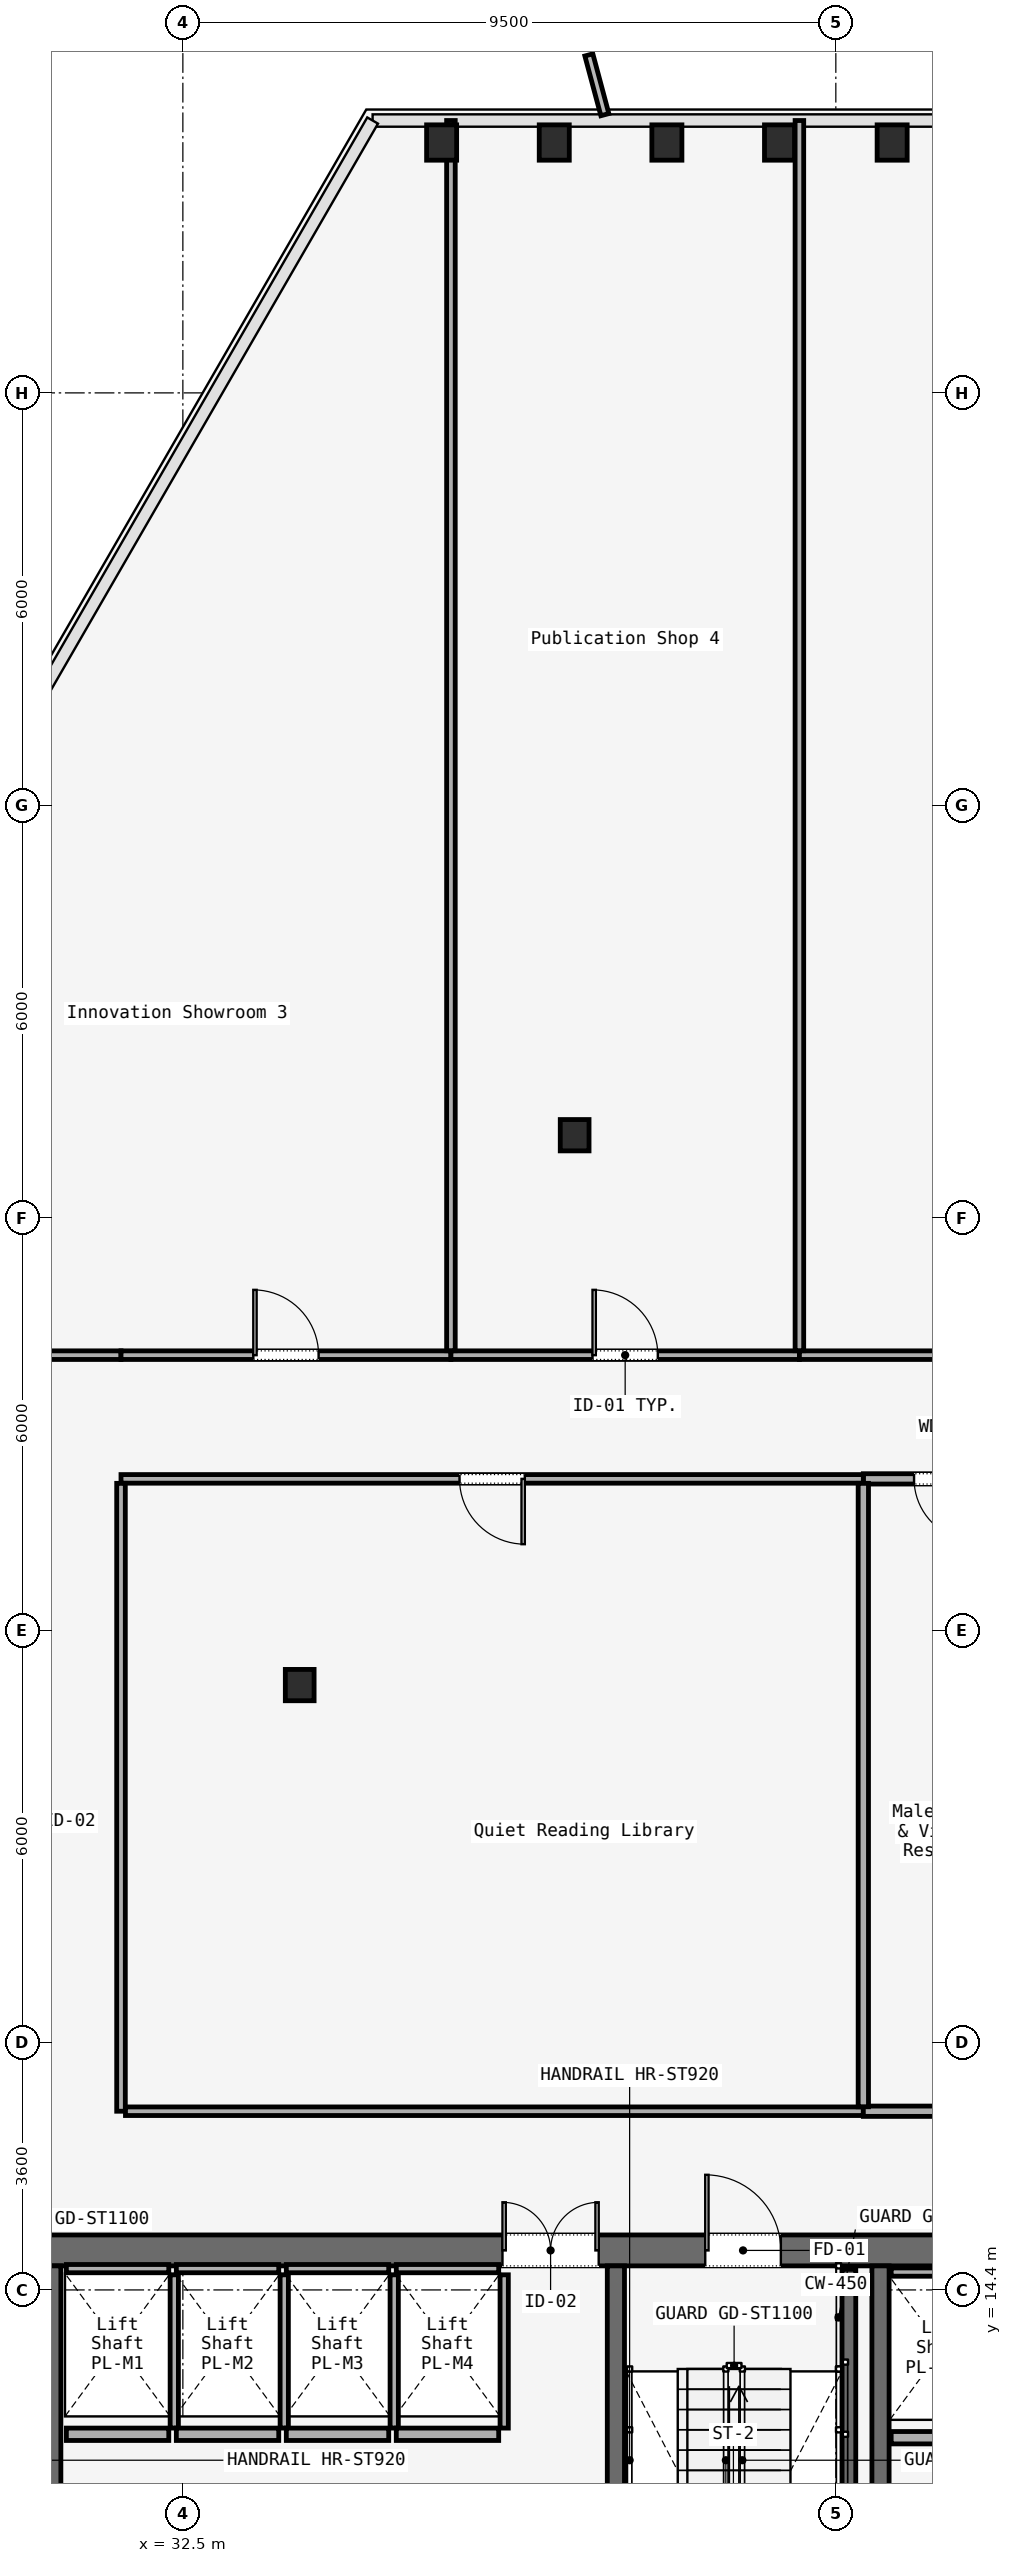
"""IFC4 building model, lengths in metres.
Left out: names, types, materials, properties, quantities, classifications, styles, units other than length and angle.
Written with IfcOpenShell. Run it as: python <this file> out.ifc"""

import sys

from ifc_helpers import new_model, si_unit, direction, frame, frame_2d, origin, origin_2d, place, context, subcontext, project, spatial, rectangle, i_section, extrude, element, fill, save


model = new_model("IFC4")
c1 = context("Model", 3, precision=1e-05, world=origin(), true_north=direction((0.0, 1.0)))
c2 = subcontext(c1, "Body", "Model", "MODEL_VIEW")
j1 = project(units=[si_unit("LENGTHUNIT", "METRE"), si_unit("PLANEANGLEUNIT", "RADIAN")], contexts=[c1])
p1 = place(None, origin())
s1 = spatial("IfcSite", under=j1, at=p1, CompositionType="ELEMENT")
p2 = place(p1, origin())
s2 = spatial("IfcBuilding", under=s1, at=p2, CompositionType="ELEMENT")
p3 = place(p2, frame((0.0, 0.0, 104.4)))
s3 = spatial("IfcBuildingStorey", under=s2, at=p3, CompositionType="ELEMENT", Elevation=104.4)
p4 = place(p3, frame((26.45, 14.975, 0.0), z_axis=(0.0, 0.0, 1.0), x_axis=(1.0, 0.0, 0.0)))
e1 = element("IfcWall", 1, at=p4, inside=s3, PredefinedType="SOLIDWALL", context=c2, shape_type="SweptSolid", body=[
    extrude(rectangle(XDim=31.1, YDim=0.45, at=frame_2d((15.55, 0.0))), origin(), (0.0, 0.0, 1.0), 3.58),
])
p5 = place(p4, frame((1.65, 0.0, 0.0)))
e2 = element("IfcOpeningElement", 2, at=p5, cuts=e1, PredefinedType="OPENING", context=c2, shape_type="SweptSolid", body=[
    extrude(rectangle(XDim=1.1, YDim=2.2, at=frame_2d((0.55, 1.1))), frame((0.0, 0.225, 0.0), z_axis=(0.0, -1.0, 0.0), x_axis=(1.0, 0.0, 0.0)), (0.0, 0.0, 1.0), 0.45),
])
p6 = place(p4, frame((13.65, 0.0, 0.0)))
e3 = element("IfcOpeningElement", 3, at=p6, cuts=e1, PredefinedType="OPENING", context=c2, shape_type="SweptSolid", body=[
    extrude(rectangle(XDim=1.1, YDim=2.2, at=frame_2d((0.55, 1.1))), frame((0.0, 0.225, 0.0), z_axis=(0.0, -1.0, 0.0), x_axis=(1.0, 0.0, 0.0)), (0.0, 0.0, 1.0), 0.45),
])
p7 = place(p4, frame((25.55, 0.0, 0.0)))
e4 = element("IfcOpeningElement", 4, at=p7, cuts=e1, PredefinedType="OPENING", context=c2, shape_type="SweptSolid", body=[
    extrude(rectangle(XDim=1.1, YDim=2.2, at=frame_2d((0.55, 1.1))), frame((0.0, 0.225, 0.0), z_axis=(0.0, -1.0, 0.0), x_axis=(1.0, 0.0, 0.0)), (0.0, 0.0, 1.0), 0.45),
])
p8 = place(p4, frame((10.7, 0.0, 0.0)))
e5 = element("IfcOpeningElement", 5, at=p8, cuts=e1, PredefinedType="OPENING", context=c2, shape_type="SweptSolid", body=[
    extrude(rectangle(XDim=1.4, YDim=2.2, at=frame_2d((0.7, 1.1))), frame((0.0, 0.225, 0.0), z_axis=(0.0, -1.0, 0.0), x_axis=(1.0, 0.0, 0.0)), (0.0, 0.0, 1.0), 0.45),
])
p9 = place(p4, frame((19.35, 0.0, 0.0)))
e6 = element("IfcOpeningElement", 6, at=p9, cuts=e1, PredefinedType="OPENING", context=c2, shape_type="SweptSolid", body=[
    extrude(rectangle(XDim=1.1, YDim=2.2, at=frame_2d((0.55, 1.1))), frame((0.0, 0.225, 0.0), z_axis=(0.0, -1.0, 0.0), x_axis=(1.0, 0.0, 0.0)), (0.0, 0.0, 1.0), 0.45),
])
p10 = place(p4, frame((21.4, 0.0, 0.0)))
e7 = element("IfcOpeningElement", 7, at=p10, cuts=e1, PredefinedType="OPENING", context=c2, shape_type="SweptSolid", body=[
    extrude(rectangle(XDim=0.9, YDim=2.1, at=frame_2d((0.45, 1.05))), frame((0.0, 0.225, 0.0), z_axis=(0.0, -1.0, 0.0), x_axis=(1.0, 0.0, 0.0)), (0.0, 0.0, 1.0), 0.45),
])
p11 = place(p4, frame((23.35, 0.0, 0.0)))
e8 = element("IfcOpeningElement", 8, at=p11, cuts=e1, PredefinedType="OPENING", context=c2, shape_type="SweptSolid", body=[
    extrude(rectangle(XDim=1.3, YDim=2.3, at=frame_2d((0.65, 1.15))), frame((0.0, 0.225, 0.0), z_axis=(0.0, -1.0, 0.0), x_axis=(1.0, 0.0, 0.0)), (0.0, 0.0, 1.0), 0.45),
])
for number, where, z_axis, x_axis in (
    (9, (30.6, 5.85, 0.0), (0.0, 0.0, 1.0), (0.0, 1.0, 0.0)),
    (10, (38.8, 5.85, 0.0), (0.0, 0.0, 1.0), (0.0, 1.0, 0.0)),
    (11, (42.65, 5.85, 0.0), (0.0, 0.0, 1.0), (0.0, 1.0, 0.0)),
):
    element("IfcWall", number, at=place(p3, frame(where, z_axis=z_axis, x_axis=x_axis)), inside=s3, PredefinedType="SOLIDWALL", context=c2, shape_type="SweptSolid", body=[
        extrude(rectangle(XDim=8.9, YDim=0.25, at=frame_2d((4.45, 0.0))), origin(), (0.0, 0.0, 1.0), 3.58),
    ])
for number, where, z_axis, x_axis in (
    (12, (34.2, 23.2, 0.0), (0.0, 0.0, 1.0), (1.0, 0.0, 0.0)),
    (13, (38.2, 31.2, 0.0), (0.0, 0.0, 1.0), (1.0, 0.0, 0.0)),
):
    element("IfcColumn", number, at=place(p3, frame(where, z_axis=z_axis, x_axis=x_axis)), inside=s3, PredefinedType="COLUMN", context=c2, shape_type="SweptSolid", body=[
        extrude(i_section(OverallWidth=0.418, OverallDepth=0.456, WebThickness=0.042, FlangeThickness=0.067, FilletRadius=0.015, at=origin_2d()), origin(), (0.0, 0.0, 1.0), 3.58),
    ])
for number, where, z_axis, x_axis in (
    (14, (42.819, 45.643, 0.0), (0.0, 0.0, 1.0), (1.0, 0.0, 0.0)),
    (15, (41.181, 45.643, 0.0), (0.0, 0.0, 1.0), (1.0, 0.0, 0.0)),
    (16, (39.542, 45.643, 0.0), (0.0, 0.0, 1.0), (1.0, 0.0, 0.0)),
    (17, (37.903, 45.643, 0.0), (0.0, 0.0, 1.0), (1.0, 0.0, 0.0)),
    (18, (36.265, 45.643, 0.0), (0.0, 0.0, 1.0), (1.0, 0.0, 0.0)),
):
    element("IfcColumn", number, at=place(p3, frame(where, z_axis=z_axis, x_axis=x_axis)), inside=s3, PredefinedType="COLUMN", context=c2, shape_type="SweptSolid", body=[
        extrude(i_section(OverallWidth=0.437, OverallDepth=0.514, WebThickness=0.061, FlangeThickness=0.077, FilletRadius=0.015, at=origin_2d()), origin(), (0.0, 0.0, 1.0), 3.58),
    ])
p12 = place(p3, frame((42.19, 14.7, 0.0), z_axis=(0.0, 0.0, 1.0), x_axis=(0.0, -1.0, 0.0)))
e19 = element("IfcWall", 19, at=p12, inside=s3, PredefinedType="SOLIDWALL", context=c2, shape_type="SweptSolid", body=[
    extrude(rectangle(XDim=7.65, YDim=0.2, at=frame_2d((3.825, 0.0))), origin(), (0.0, 0.0, 1.0), 3.8),
])
p13 = place(p3, frame((30.805, 12.3, 0.0), z_axis=(0.0, 0.0, 1.0), x_axis=(1.0, 0.0, 0.0)))
e20 = element("IfcWall", 20, at=p13, inside=s3, PredefinedType="SOLIDWALL", context=c2, shape_type="SweptSolid", body=[
    extrude(rectangle(XDim=1.49, YDim=0.18, at=frame_2d((0.745, 0.0))), origin(), (0.0, 0.0, 1.0), 2.95),
])
p14 = place(p3, frame((30.805, 14.71, 0.0), z_axis=(0.0, 0.0, 1.0), x_axis=(1.0, 0.0, 0.0)))
e21 = element("IfcWall", 21, at=p14, inside=s3, PredefinedType="SOLIDWALL", context=c2, shape_type="SweptSolid", body=[
    extrude(rectangle(XDim=1.49, YDim=0.12, at=frame_2d((0.745, 0.0))), origin(), (0.0, 0.0, 1.0), 2.95),
])
p15 = place(p3, frame((32.375, 12.39, 0.0), z_axis=(0.0, 0.0, 1.0), x_axis=(0.0, 1.0, 0.0)))
e22 = element("IfcWall", 22, at=p15, inside=s3, PredefinedType="SOLIDWALL", context=c2, shape_type="SweptSolid", body=[
    extrude(rectangle(XDim=2.23, YDim=0.12, at=frame_2d((1.115, 0.0))), origin(), (0.0, 0.0, 1.0), 2.95),
])
p16 = place(p3, frame((32.405, 12.3, 0.0), z_axis=(0.0, 0.0, 1.0), x_axis=(1.0, 0.0, 0.0)))
e23 = element("IfcWall", 23, at=p16, inside=s3, PredefinedType="SOLIDWALL", context=c2, shape_type="SweptSolid", body=[
    extrude(rectangle(XDim=1.49, YDim=0.18, at=frame_2d((0.745, 0.0))), origin(), (0.0, 0.0, 1.0), 2.95),
])
p17 = place(p3, frame((32.405, 14.71, 0.0), z_axis=(0.0, 0.0, 1.0), x_axis=(1.0, 0.0, 0.0)))
e24 = element("IfcWall", 24, at=p17, inside=s3, PredefinedType="SOLIDWALL", context=c2, shape_type="SweptSolid", body=[
    extrude(rectangle(XDim=1.49, YDim=0.12, at=frame_2d((0.745, 0.0))), origin(), (0.0, 0.0, 1.0), 2.95),
])
p18 = place(p3, frame((33.975, 12.39, 0.0), z_axis=(0.0, 0.0, 1.0), x_axis=(0.0, 1.0, 0.0)))
e25 = element("IfcWall", 25, at=p18, inside=s3, PredefinedType="SOLIDWALL", context=c2, shape_type="SweptSolid", body=[
    extrude(rectangle(XDim=2.23, YDim=0.12, at=frame_2d((1.115, 0.0))), origin(), (0.0, 0.0, 1.0), 2.95),
])
p19 = place(p3, frame((34.005, 12.3, 0.0), z_axis=(0.0, 0.0, 1.0), x_axis=(1.0, 0.0, 0.0)))
e26 = element("IfcWall", 26, at=p19, inside=s3, PredefinedType="SOLIDWALL", context=c2, shape_type="SweptSolid", body=[
    extrude(rectangle(XDim=1.49, YDim=0.18, at=frame_2d((0.745, 0.0))), origin(), (0.0, 0.0, 1.0), 2.95),
])
p20 = place(p3, frame((34.005, 14.71, 0.0), z_axis=(0.0, 0.0, 1.0), x_axis=(1.0, 0.0, 0.0)))
e27 = element("IfcWall", 27, at=p20, inside=s3, PredefinedType="SOLIDWALL", context=c2, shape_type="SweptSolid", body=[
    extrude(rectangle(XDim=1.49, YDim=0.12, at=frame_2d((0.745, 0.0))), origin(), (0.0, 0.0, 1.0), 2.95),
])
p21 = place(p3, frame((35.575, 12.39, 0.0), z_axis=(0.0, 0.0, 1.0), x_axis=(0.0, 1.0, 0.0)))
e28 = element("IfcWall", 28, at=p21, inside=s3, PredefinedType="SOLIDWALL", context=c2, shape_type="SweptSolid", body=[
    extrude(rectangle(XDim=2.23, YDim=0.12, at=frame_2d((1.115, 0.0))), origin(), (0.0, 0.0, 1.0), 2.95),
])
p22 = place(p3, frame((35.605, 12.3, 0.0), z_axis=(0.0, 0.0, 1.0), x_axis=(1.0, 0.0, 0.0)))
e29 = element("IfcWall", 29, at=p22, inside=s3, PredefinedType="SOLIDWALL", context=c2, shape_type="SweptSolid", body=[
    extrude(rectangle(XDim=1.49, YDim=0.18, at=frame_2d((0.745, 0.0))), origin(), (0.0, 0.0, 1.0), 2.95),
])
p23 = place(p3, frame((35.605, 14.71, 0.0), z_axis=(0.0, 0.0, 1.0), x_axis=(1.0, 0.0, 0.0)))
e30 = element("IfcWall", 30, at=p23, inside=s3, PredefinedType="SOLIDWALL", context=c2, shape_type="SweptSolid", body=[
    extrude(rectangle(XDim=1.49, YDim=0.12, at=frame_2d((0.745, 0.0))), origin(), (0.0, 0.0, 1.0), 2.95),
])
p24 = place(p3, frame((37.175, 12.39, 0.0), z_axis=(0.0, 0.0, 1.0), x_axis=(0.0, 1.0, 0.0)))
e31 = element("IfcWall", 31, at=p24, inside=s3, PredefinedType="SOLIDWALL", context=c2, shape_type="SweptSolid", body=[
    extrude(rectangle(XDim=2.23, YDim=0.12, at=frame_2d((1.115, 0.0))), origin(), (0.0, 0.0, 1.0), 2.95),
])
p25 = place(p3, frame((42.805, 12.25, 0.0), z_axis=(0.0, 0.0, 1.0), x_axis=(1.0, 0.0, 0.0)))
e32 = element("IfcWall", 32, at=p25, inside=s3, PredefinedType="SOLIDWALL", context=c2, shape_type="SweptSolid", body=[
    extrude(rectangle(XDim=1.49, YDim=0.18, at=frame_2d((0.745, 0.0))), origin(), (0.0, 0.0, 1.0), 2.95),
])
p26 = place(p3, frame((42.805, 14.66, 0.0), z_axis=(0.0, 0.0, 1.0), x_axis=(1.0, 0.0, 0.0)))
e33 = element("IfcWall", 33, at=p26, inside=s3, PredefinedType="SOLIDWALL", context=c2, shape_type="SweptSolid", body=[
    extrude(rectangle(XDim=1.49, YDim=0.12, at=frame_2d((0.745, 0.0))), origin(), (0.0, 0.0, 1.0), 2.95),
])
p27 = place(p3, frame((29.865, 28.0, 0.0), z_axis=(0.0, 0.0, 1.0), x_axis=(1.0, 0.0, 0.0)))
e34 = element("IfcWall", 34, at=p27, inside=s3, PredefinedType="PARTITIONING", context=c2, shape_type="SweptSolid", body=[
    extrude(rectangle(XDim=1.735, YDim=0.125, at=frame_2d((0.868, 0.0))), origin(), (0.0, 0.0, 1.0), 2.95),
])
p28 = place(p3, frame((31.6, 28.0, 0.0), z_axis=(0.0, 0.0, 1.0), x_axis=(1.0, 0.0, 0.0)))
e35 = element("IfcWall", 35, at=p28, inside=s3, PredefinedType="PARTITIONING", context=c2, shape_type="SweptSolid", body=[
    extrude(rectangle(XDim=4.8, YDim=0.125, at=frame_2d((2.4, 0.0))), origin(), (0.0, 0.0, 1.0), 2.95),
])
p29 = place(p28, frame((1.925, 0.0, 0.0)))
e36 = element("IfcOpeningElement", 36, at=p29, cuts=e35, PredefinedType="OPENING", context=c2, shape_type="SweptSolid", body=[
    extrude(rectangle(XDim=0.95, YDim=2.2, at=frame_2d((0.475, 1.1))), frame((0.0, 0.062, 0.0), z_axis=(0.0, -1.0, 0.0), x_axis=(1.0, 0.0, 0.0)), (0.0, 0.0, 1.0), 0.125),
])
p30 = place(p3, frame((36.4, 28.0, 0.0), z_axis=(0.0, 0.0, 1.0), x_axis=(1.0, 0.0, 0.0)))
e37 = element("IfcWall", 37, at=p30, inside=s3, PredefinedType="PARTITIONING", context=c2, shape_type="SweptSolid", body=[
    extrude(rectangle(XDim=5.07, YDim=0.125, at=frame_2d((2.535, 0.0))), origin(), (0.0, 0.0, 1.0), 2.95),
])
p31 = place(p30, frame((2.06, 0.0, 0.0)))
e38 = element("IfcOpeningElement", 38, at=p31, cuts=e37, PredefinedType="OPENING", context=c2, shape_type="SweptSolid", body=[
    extrude(rectangle(XDim=0.95, YDim=2.2, at=frame_2d((0.475, 1.1))), frame((0.0, 0.062, 0.0), z_axis=(0.0, -1.0, 0.0), x_axis=(1.0, 0.0, 0.0)), (0.0, 0.0, 1.0), 0.125),
])
p32 = place(p3, frame((41.47, 28.0, 0.0), z_axis=(0.0, 0.0, 1.0), x_axis=(1.0, 0.0, 0.0)))
e39 = element("IfcWall", 39, at=p32, inside=s3, PredefinedType="PARTITIONING", context=c2, shape_type="SweptSolid", body=[
    extrude(rectangle(XDim=7.93, YDim=0.125, at=frame_2d((3.965, 0.0))), origin(), (0.0, 0.0, 1.0), 2.95),
])
p33 = place(p32, frame((3.49, 0.0, 0.0)))
e40 = element("IfcOpeningElement", 40, at=p33, cuts=e39, PredefinedType="OPENING", context=c2, shape_type="SweptSolid", body=[
    extrude(rectangle(XDim=0.95, YDim=2.2, at=frame_2d((0.475, 1.1))), frame((0.0, 0.062, 0.0), z_axis=(0.0, -1.0, 0.0), x_axis=(1.0, 0.0, 0.0)), (0.0, 0.0, 1.0), 0.125),
])
p34 = place(p3, frame((44.776, 26.2, 0.0), z_axis=(0.0, 0.0, 1.0), x_axis=(-1.0, 0.0, 0.0)))
e41 = element("IfcWall", 41, at=p34, inside=s3, PredefinedType="PARTITIONING", context=c2, shape_type="SweptSolid", body=[
    extrude(rectangle(XDim=2.376, YDim=0.15, at=frame_2d((1.188, 0.0))), origin(), (0.0, 0.0, 1.0), 2.95),
])
p35 = place(p34, frame((0.738, 0.0, 0.0)))
e42 = element("IfcOpeningElement", 42, at=p35, cuts=e41, PredefinedType="OPENING", context=c2, shape_type="SweptSolid", body=[
    extrude(rectangle(XDim=0.9, YDim=2.15, at=frame_2d((0.45, 1.075))), frame((0.0, 0.075, 0.0), z_axis=(0.0, -1.0, 0.0), x_axis=(1.0, 0.0, 0.0)), (0.0, 0.0, 1.0), 0.15),
])
p36 = place(p3, frame((42.4, 26.2, 0.0), z_axis=(0.0, 0.0, 1.0), x_axis=(-1.0, 0.0, 0.0)))
e43 = element("IfcWall", 43, at=p36, inside=s3, PredefinedType="PARTITIONING", context=c2, shape_type="SweptSolid", body=[
    extrude(rectangle(XDim=10.8, YDim=0.125, at=frame_2d((5.4, 0.0))), origin(), (0.0, 0.0, 1.0), 2.95),
])
p37 = place(p36, frame((4.925, 0.0, 0.0)))
e44 = element("IfcOpeningElement", 44, at=p37, cuts=e43, PredefinedType="OPENING", context=c2, shape_type="SweptSolid", body=[
    extrude(rectangle(XDim=0.95, YDim=2.2, at=frame_2d((0.475, 1.1))), frame((0.0, 0.062, 0.0), z_axis=(0.0, -1.0, 0.0), x_axis=(1.0, 0.0, 0.0)), (0.0, 0.0, 1.0), 0.125),
])
p38 = place(p3, frame((31.6, 26.135, 0.0), z_axis=(0.0, 0.0, 1.0), x_axis=(0.0, -1.0, 0.0)))
e45 = element("IfcWall", 45, at=p38, inside=s3, PredefinedType="PARTITIONING", context=c2, shape_type="SweptSolid", body=[
    extrude(rectangle(XDim=9.135, YDim=0.125, at=frame_2d((4.567, 0.0))), origin(), (0.0, 0.0, 1.0), 2.95),
])
p39 = place(p3, frame((31.665, 17.0, 0.0), z_axis=(0.0, 0.0, 1.0), x_axis=(1.0, 0.0, 0.0)))
e46 = element("IfcWall", 46, at=p39, inside=s3, PredefinedType="PARTITIONING", context=c2, shape_type="SweptSolid", body=[
    extrude(rectangle(XDim=10.735, YDim=0.125, at=frame_2d((5.367, 0.0))), origin(), (0.0, 0.0, 1.0), 2.95),
])
p40 = place(p3, frame((42.4, 17.0, 0.0), z_axis=(0.0, 0.0, 1.0), x_axis=(1.0, 0.0, 0.0)))
e47 = element("IfcWall", 47, at=p40, inside=s3, PredefinedType="PARTITIONING", context=c2, shape_type="SweptSolid", body=[
    extrude(rectangle(XDim=2.376, YDim=0.15, at=frame_2d((1.188, 0.0))), origin(), (0.0, 0.0, 1.0), 2.95),
])
p41 = place(p3, frame((42.4, 26.135, 0.0), z_axis=(0.0, 0.0, 1.0), x_axis=(0.0, -1.0, 0.0)))
e48 = element("IfcWall", 48, at=p41, inside=s3, PredefinedType="PARTITIONING", context=c2, shape_type="SweptSolid", body=[
    extrude(rectangle(XDim=9.07, YDim=0.15, at=frame_2d((4.535, 0.0))), origin(), (0.0, 0.0, 1.0), 2.95),
])
for number, where, z_axis, x_axis in (
    (49, (36.4, 45.963, 0.0), (0.0, 0.0, 1.0), (0.0, -1.0, 0.0)),
    (50, (41.47, 28.065, 0.0), (0.0, 0.0, 1.0), (0.0, 1.0, 0.0)),
):
    element("IfcWall", number, at=place(p3, frame(where, z_axis=z_axis, x_axis=x_axis)), inside=s3, PredefinedType="PARTITIONING", context=c2, shape_type="SweptSolid", body=[
        extrude(rectangle(XDim=17.898, YDim=0.125, at=frame_2d((8.949, 0.0))), origin(), (0.0, 0.0, 1.0), 2.95),
    ])
p42 = place(p6, origin())
e51 = element("IfcDoor", 51, at=p42, inside=s3, OperationType="SINGLE_SWING_RIGHT", PredefinedType="DOOR", context=c2, shape_type="SweptSolid", body=[
    extrude(rectangle(XDim=1.1, YDim=2.2, at=frame_2d((0.55, 1.1))), frame((0.0, 0.025, 0.0), z_axis=(0.0, -1.0, 0.0), x_axis=(1.0, 0.0, 0.0)), (0.0, 0.0, 1.0), 0.05),
])
fill(e3, e51)
p43 = place(p8, origin())
e52 = element("IfcDoor", 52, at=p43, inside=s3, OperationType="DOUBLE_DOOR_SINGLE_SWING", PredefinedType="DOOR", context=c2, shape_type="SweptSolid", body=[
    extrude(rectangle(XDim=1.4, YDim=2.2, at=frame_2d((0.7, 1.1))), frame((0.0, 0.025, 0.0), z_axis=(0.0, -1.0, 0.0), x_axis=(1.0, 0.0, 0.0)), (0.0, 0.0, 1.0), 0.05),
])
fill(e5, e52)
p44 = place(p37, origin())
e53 = element("IfcDoor", 53, at=p44, inside=s3, OperationType="SINGLE_SWING_RIGHT", PredefinedType="DOOR", context=c2, shape_type="SweptSolid", body=[
    extrude(rectangle(XDim=0.95, YDim=2.2, at=frame_2d((0.475, 1.1))), frame((0.0, 0.025, 0.0), z_axis=(0.0, -1.0, 0.0), x_axis=(1.0, 0.0, 0.0)), (0.0, 0.0, 1.0), 0.05),
])
fill(e44, e53)
p45 = place(p35, origin())
e54 = element("IfcDoor", 54, at=p45, inside=s3, OperationType="SINGLE_SWING_LEFT", PredefinedType="DOOR", context=c2, shape_type="SweptSolid", body=[
    extrude(rectangle(XDim=0.9, YDim=2.15, at=frame_2d((0.45, 1.075))), frame((0.0, 0.025, 0.0), z_axis=(0.0, -1.0, 0.0), x_axis=(1.0, 0.0, 0.0)), (0.0, 0.0, 1.0), 0.05),
])
fill(e42, e54)
p46 = place(p29, origin())
e55 = element("IfcDoor", 55, at=p46, inside=s3, OperationType="SINGLE_SWING_RIGHT", PredefinedType="DOOR", context=c2, shape_type="SweptSolid", body=[
    extrude(rectangle(XDim=0.95, YDim=2.2, at=frame_2d((0.475, 1.1))), frame((0.0, 0.025, 0.0), z_axis=(0.0, -1.0, 0.0), x_axis=(1.0, 0.0, 0.0)), (0.0, 0.0, 1.0), 0.05),
])
fill(e36, e55)
p47 = place(p31, origin())
e56 = element("IfcDoor", 56, at=p47, inside=s3, OperationType="SINGLE_SWING_RIGHT", PredefinedType="DOOR", context=c2, shape_type="SweptSolid", body=[
    extrude(rectangle(XDim=0.95, YDim=2.2, at=frame_2d((0.475, 1.1))), frame((0.0, 0.025, 0.0), z_axis=(0.0, -1.0, 0.0), x_axis=(1.0, 0.0, 0.0)), (0.0, 0.0, 1.0), 0.05),
])
fill(e38, e56)
save(model, sys.argv[1])
